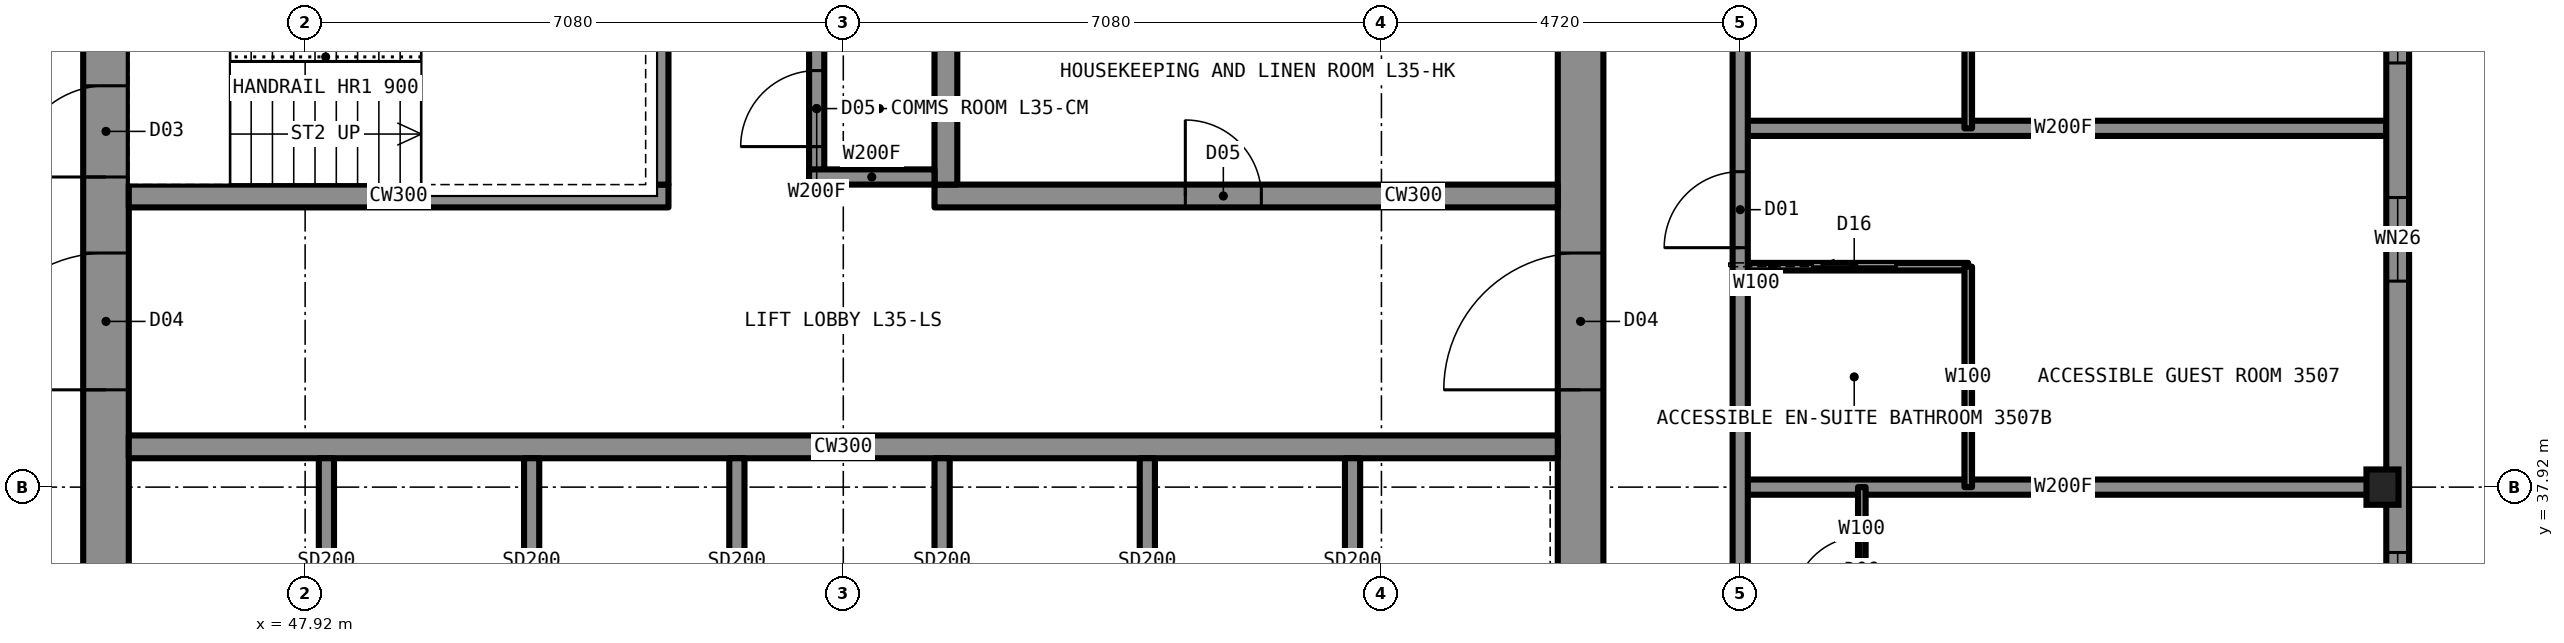
"""IFC4 building model, lengths in metres.
Left out: names, types, materials, properties, quantities, classifications, styles, units other than length and angle.
Written with IfcOpenShell. Run it as: python <this file> out.ifc"""

import sys

from ifc_helpers import new_model, si_unit, direction, frame, frame_2d, origin, origin_2d, place, context, subcontext, project, spatial, rectangle, i_section, extrude, element, fill, save


model = new_model("IFC4")
c1 = context("Model", 3, precision=1e-05, world=origin(), true_north=direction((0.0, 1.0)))
c2 = subcontext(c1, "Body", "Model", "MODEL_VIEW")
j1 = project(units=[si_unit("LENGTHUNIT", "METRE"), si_unit("PLANEANGLEUNIT", "RADIAN")], contexts=[c1])
p1 = place(None, origin())
s1 = spatial("IfcSite", under=j1, at=p1, CompositionType="ELEMENT")
p2 = place(p1, origin())
s2 = spatial("IfcBuilding", under=s1, at=p2, CompositionType="ELEMENT")
p3 = place(p2, frame((0.0, 0.0, 124.9)))
s3 = spatial("IfcBuildingStorey", under=s2, at=p3, CompositionType="ELEMENT", Elevation=124.9)
p4 = place(p3, frame((75.25, 37.92, 0.0), z_axis=(0.0, 0.0, 1.0), x_axis=(1.0, 0.0, 0.0)))
e1 = element("IfcColumn", 1, at=p4, inside=s3, PredefinedType="COLUMN", context=c2, shape_type="SweptSolid", body=[
    extrude(i_section(OverallWidth=0.422, OverallDepth=0.465, WebThickness=0.045, FlangeThickness=0.073, at=origin_2d()), origin(), (0.0, 0.0, 1.0), 3.5),
])
p5 = place(p3, frame((64.7, 35.6, 0.0), z_axis=(0.0, 0.0, 1.0), x_axis=(0.0, 1.0, 0.0)))
e2 = element("IfcWall", 2, at=p5, inside=s3, PredefinedType="SHEAR", context=c2, shape_type="SweptSolid", body=[
    extrude(rectangle(XDim=18.8, YDim=0.6, at=frame_2d((9.4, 0.0))), origin(), (0.0, 0.0, 1.0), 3.5),
])
p6 = place(p5, frame((13.4, 0.0, 0.0)))
e3 = element("IfcOpeningElement", 3, at=p6, cuts=e2, PredefinedType="OPENING", context=c2, shape_type="SweptSolid", body=[
    extrude(rectangle(XDim=1.8, YDim=2.2, at=frame_2d((0.9, 1.1))), frame((0.0, 0.31, 0.0), z_axis=(0.0, -1.0, 0.0), x_axis=(1.0, 0.0, 0.0)), (0.0, 0.0, 1.0), 0.62),
])
p7 = place(p5, frame((3.6, 0.0, 0.0)))
e4 = element("IfcOpeningElement", 4, at=p7, cuts=e2, PredefinedType="OPENING", context=c2, shape_type="SweptSolid", body=[
    extrude(rectangle(XDim=1.8, YDim=2.2, at=frame_2d((0.9, 1.1))), frame((0.0, 0.31, 0.0), z_axis=(0.0, -1.0, 0.0), x_axis=(1.0, 0.0, 0.0)), (0.0, 0.0, 1.0), 0.62),
])
p8 = place(p3, frame((45.3, 35.6, 0.0), z_axis=(0.0, 0.0, 1.0), x_axis=(0.0, 1.0, 0.0)))
e5 = element("IfcWall", 5, at=p8, inside=s3, PredefinedType="SHEAR", context=c2, shape_type="SweptSolid", body=[
    extrude(rectangle(XDim=18.8, YDim=0.6, at=frame_2d((9.4, 0.0))), origin(), (0.0, 0.0, 1.0), 3.5),
])
p9 = place(p8, frame((13.4, 0.0, 0.0)))
e6 = element("IfcOpeningElement", 6, at=p9, cuts=e5, PredefinedType="OPENING", context=c2, shape_type="SweptSolid", body=[
    extrude(rectangle(XDim=1.8, YDim=2.2, at=frame_2d((0.9, 1.1))), frame((0.0, 0.31, 0.0), z_axis=(0.0, -1.0, 0.0), x_axis=(1.0, 0.0, 0.0)), (0.0, 0.0, 1.0), 0.62),
])
p10 = place(p8, frame((3.6, 0.0, 0.0)))
e7 = element("IfcOpeningElement", 7, at=p10, cuts=e5, PredefinedType="OPENING", context=c2, shape_type="SweptSolid", body=[
    extrude(rectangle(XDim=1.8, YDim=2.2, at=frame_2d((0.9, 1.1))), frame((0.0, 0.31, 0.0), z_axis=(0.0, -1.0, 0.0), x_axis=(1.0, 0.0, 0.0)), (0.0, 0.0, 1.0), 0.62),
])
p11 = place(p8, frame((6.4, 0.0, 0.0)))
e8 = element("IfcOpeningElement", 8, at=p11, cuts=e5, PredefinedType="OPENING", context=c2, shape_type="SweptSolid", body=[
    extrude(rectangle(XDim=1.2, YDim=2.2, at=frame_2d((0.6, 1.1))), frame((0.0, 0.31, 0.0), z_axis=(0.0, -1.0, 0.0), x_axis=(1.0, 0.0, 0.0)), (0.0, 0.0, 1.0), 0.62),
])
p12 = place(p3, frame((45.6, 38.45, 0.0), z_axis=(0.0, 0.0, 1.0), x_axis=(1.0, 0.0, 0.0)))
e9 = element("IfcWall", 9, at=p12, inside=s3, PredefinedType="SHEAR", context=c2, shape_type="SweptSolid", body=[
    extrude(rectangle(XDim=18.8, YDim=0.3, at=frame_2d((9.4, 0.0))), origin(), (0.0, 0.0, 1.0), 3.5),
])
p13 = place(p3, frame((45.6, 41.75, 0.0), z_axis=(0.0, 0.0, 1.0), x_axis=(1.0, 0.0, 0.0)))
e10 = element("IfcWall", 10, at=p13, inside=s3, PredefinedType="SHEAR", context=c2, shape_type="SweptSolid", body=[
    extrude(rectangle(XDim=7.1, YDim=0.3, at=frame_2d((3.55, 0.0))), origin(), (0.0, 0.0, 1.0), 3.5),
])
p14 = place(p3, frame((56.2, 41.75, 0.0), z_axis=(0.0, 0.0, 1.0), x_axis=(1.0, 0.0, 0.0)))
e11 = element("IfcWall", 11, at=p14, inside=s3, PredefinedType="SHEAR", context=c2, shape_type="SweptSolid", body=[
    extrude(rectangle(XDim=8.2, YDim=0.3, at=frame_2d((4.1, 0.0))), origin(), (0.0, 0.0, 1.0), 3.5),
])
p15 = place(p14, frame((3.3, 0.0, 0.0)))
e12 = element("IfcOpeningElement", 12, at=p15, cuts=e11, PredefinedType="OPENING", context=c2, shape_type="SweptSolid", body=[
    extrude(rectangle(XDim=1.0, YDim=2.1, at=frame_2d((0.5, 1.05))), frame((0.0, 0.16, 0.0), z_axis=(0.0, -1.0, 0.0), x_axis=(1.0, 0.0, 0.0)), (0.0, 0.0, 1.0), 0.32),
])
p16 = place(p3, frame((52.55, 41.9, 0.0), z_axis=(0.0, 0.0, 1.0), x_axis=(0.0, 1.0, 0.0)))
e13 = element("IfcWall", 13, at=p16, inside=s3, PredefinedType="SHEAR", context=c2, shape_type="SweptSolid", body=[
    extrude(rectangle(XDim=6.2, YDim=0.3, at=frame_2d((3.1, 0.0))), origin(), (0.0, 0.0, 1.0), 3.5),
])
p17 = place(p16, frame((4.125, 0.0, 0.0)))
e14 = element("IfcOpeningElement", 14, at=p17, cuts=e13, PredefinedType="OPENING", context=c2, shape_type="SweptSolid", body=[
    extrude(rectangle(XDim=1.2, YDim=2.2, at=frame_2d((0.6, 1.1))), frame((0.0, 0.16, 0.0), z_axis=(0.0, -1.0, 0.0), x_axis=(1.0, 0.0, 0.0)), (0.0, 0.0, 1.0), 0.32),
])
p18 = place(p3, frame((56.35, 41.9, 0.0), z_axis=(0.0, 0.0, 1.0), x_axis=(0.0, 1.0, 0.0)))
e15 = element("IfcWall", 15, at=p18, inside=s3, PredefinedType="SHEAR", context=c2, shape_type="SweptSolid", body=[
    extrude(rectangle(XDim=9.5, YDim=0.3, at=frame_2d((4.75, 0.0))), origin(), (0.0, 0.0, 1.0), 3.5),
])
p19 = place(p18, frame((7.1, 0.0, 0.0)))
e16 = element("IfcOpeningElement", 16, at=p19, cuts=e15, PredefinedType="OPENING", context=c2, shape_type="SweptSolid", body=[
    extrude(rectangle(XDim=1.8, YDim=2.2, at=frame_2d((0.9, 1.1))), frame((0.0, 0.16, 0.0), z_axis=(0.0, -1.0, 0.0), x_axis=(1.0, 0.0, 0.0)), (0.0, 0.0, 1.0), 0.32),
])
p20 = place(p3, frame((66.8, 42.64, 0.0), z_axis=(0.0, 0.0, 1.0), x_axis=(1.0, 0.0, 0.0)))
e17 = element("IfcWall", 17, at=p20, inside=s3, PredefinedType="PARTITIONING", context=c2, shape_type="SweptSolid", body=[
    extrude(rectangle(XDim=8.5, YDim=0.2, at=frame_2d((4.25, 0.0))), origin(), (0.0, 0.0, 1.0), 2.731),
])
p21 = place(p3, frame((66.8, 40.82, 0.0), z_axis=(0.0, 0.0, 1.0), x_axis=(1.0, 0.0, 0.0)))
e18 = element("IfcWall", 18, at=p21, inside=s3, PredefinedType="PARTITIONING", context=c2, shape_type="SweptSolid", body=[
    extrude(rectangle(XDim=3.0, YDim=0.1, at=frame_2d((1.5, 0.0))), origin(), (0.0, 0.0, 1.0), 3.33),
])
p22 = place(p21, frame((0.95, 0.0, 0.0)))
e19 = element("IfcOpeningElement", 19, at=p22, cuts=e18, PredefinedType="OPENING", context=c2, shape_type="SweptSolid", body=[
    extrude(rectangle(XDim=1.1, YDim=2.1, at=frame_2d((0.55, 1.05))), frame((0.0, 0.06, 0.0), z_axis=(0.0, -1.0, 0.0), x_axis=(1.0, 0.0, 0.0)), (0.0, 0.0, 1.0), 0.12),
])
p23 = place(p3, frame((66.8, 37.92, 0.0), z_axis=(0.0, 0.0, 1.0), x_axis=(1.0, 0.0, 0.0)))
e20 = element("IfcWall", 20, at=p23, inside=s3, PredefinedType="PARTITIONING", context=c2, shape_type="SweptSolid", body=[
    extrude(rectangle(XDim=8.5, YDim=0.2, at=frame_2d((4.25, 0.0))), origin(), (0.0, 0.0, 1.0), 2.573),
])
p24 = place(p3, frame((66.8, 33.22, 0.0), z_axis=(0.0, 0.0, 1.0), x_axis=(0.0, 1.0, 0.0)))
e21 = element("IfcWall", 21, at=p24, inside=s3, PredefinedType="PARTITIONING", context=c2, shape_type="SweptSolid", body=[
    extrude(rectangle(XDim=23.58, YDim=0.2, at=frame_2d((11.79, 0.0))), origin(), (0.0, 0.0, 1.0), 3.33),
])
p25 = place(p24, frame((7.85, 0.0, 0.0)))
e22 = element("IfcOpeningElement", 22, at=p25, cuts=e21, PredefinedType="OPENING", context=c2, shape_type="SweptSolid", body=[
    extrude(rectangle(XDim=1.0, YDim=2.2, at=frame_2d((0.5, 1.1))), frame((0.0, 0.11, 0.0), z_axis=(0.0, -1.0, 0.0), x_axis=(1.0, 0.0, 0.0)), (0.0, 0.0, 1.0), 0.22),
])
p26 = place(p24, frame((12.42, 0.0, 0.0)))
e23 = element("IfcOpeningElement", 23, at=p26, cuts=e21, PredefinedType="OPENING", context=c2, shape_type="SweptSolid", body=[
    extrude(rectangle(XDim=1.0, YDim=2.2, at=frame_2d((0.5, 1.1))), frame((0.0, 0.11, 0.0), z_axis=(0.0, -1.0, 0.0), x_axis=(1.0, 0.0, 0.0)), (0.0, 0.0, 1.0), 0.22),
])
p27 = place(p24, frame((21.83, 0.0, 0.0)))
e24 = element("IfcOpeningElement", 24, at=p27, cuts=e21, PredefinedType="OPENING", context=c2, shape_type="SweptSolid", body=[
    extrude(rectangle(XDim=1.1, YDim=2.2, at=frame_2d((0.55, 1.1))), frame((0.0, 0.11, 0.0), z_axis=(0.0, -1.0, 0.0), x_axis=(1.0, 0.0, 0.0)), (0.0, 0.0, 1.0), 0.22),
])
p28 = place(p24, frame((0.63, 0.0, 0.0)))
e25 = element("IfcOpeningElement", 25, at=p28, cuts=e21, PredefinedType="OPENING", context=c2, shape_type="SweptSolid", body=[
    extrude(rectangle(XDim=1.1, YDim=2.2, at=frame_2d((0.55, 1.1))), frame((0.0, 0.11, 0.0), z_axis=(0.0, -1.0, 0.0), x_axis=(1.0, 0.0, 0.0)), (0.0, 0.0, 1.0), 0.22),
])
p29 = place(p3, frame((68.4, 35.72, 0.0), z_axis=(0.0, 0.0, 1.0), x_axis=(0.0, 1.0, 0.0)))
e26 = element("IfcWall", 26, at=p29, inside=s3, PredefinedType="PARTITIONING", context=c2, shape_type="SweptSolid", body=[
    extrude(rectangle(XDim=2.2, YDim=0.1, at=frame_2d((1.1, 0.0))), origin(), (0.0, 0.0, 1.0), 3.33),
])
p30 = place(p29, frame((0.65, 0.0, 0.0)))
e27 = element("IfcOpeningElement", 27, at=p30, cuts=e26, PredefinedType="OPENING", context=c2, shape_type="SweptSolid", body=[
    extrude(rectangle(XDim=0.9, YDim=2.1, at=frame_2d((0.45, 1.05))), frame((0.0, 0.06, 0.0), z_axis=(0.0, -1.0, 0.0), x_axis=(1.0, 0.0, 0.0)), (0.0, 0.0, 1.0), 0.12),
])
p31 = place(p3, frame((69.8, 37.92, 0.0), z_axis=(0.0, 0.0, 1.0), x_axis=(0.0, 1.0, 0.0)))
e28 = element("IfcWall", 28, at=p31, inside=s3, PredefinedType="PARTITIONING", context=c2, shape_type="SweptSolid", body=[
    extrude(rectangle(XDim=2.9, YDim=0.1, at=frame_2d((1.45, 0.0))), origin(), (0.0, 0.0, 1.0), 3.33),
])
p32 = place(p3, frame((69.8, 42.64, 0.0), z_axis=(0.0, 0.0, 1.0), x_axis=(0.0, 1.0, 0.0)))
e29 = element("IfcWall", 29, at=p32, inside=s3, PredefinedType="PARTITIONING", context=c2, shape_type="SweptSolid", body=[
    extrude(rectangle(XDim=2.6, YDim=0.1, at=frame_2d((1.3, 0.0))), origin(), (0.0, 0.0, 1.0), 3.33),
])
p33 = place(p3, frame((54.35, 42.0, 0.0), z_axis=(0.0, 0.0, 1.0), x_axis=(0.0, 1.0, 0.0)))
e30 = element("IfcWall", 30, at=p33, inside=s3, PredefinedType="PARTITIONING", context=c2, shape_type="SweptSolid", body=[
    extrude(rectangle(XDim=2.5, YDim=0.2, at=frame_2d((1.25, 0.0))), origin(), (0.0, 0.0, 1.0), 3.33),
])
p34 = place(p33, frame((0.75, 0.0, 0.0)))
e31 = element("IfcOpeningElement", 31, at=p34, cuts=e30, PredefinedType="OPENING", context=c2, shape_type="SweptSolid", body=[
    extrude(rectangle(XDim=1.0, YDim=2.1, at=frame_2d((0.5, 1.05))), frame((0.0, 0.11, 0.0), z_axis=(0.0, -1.0, 0.0), x_axis=(1.0, 0.0, 0.0)), (0.0, 0.0, 1.0), 0.22),
])
p35 = place(p3, frame((54.25, 42.0, 0.0), z_axis=(0.0, 0.0, 1.0), x_axis=(1.0, 0.0, 0.0)))
e32 = element("IfcWall", 32, at=p35, inside=s3, PredefinedType="PARTITIONING", context=c2, shape_type="SweptSolid", body=[
    extrude(rectangle(XDim=1.95, YDim=0.2, at=frame_2d((0.975, 0.0))), origin(), (0.0, 0.0, 1.0), 3.33),
])
p36 = place(p3, frame((75.45, 29.9, 0.0), z_axis=(0.0, 0.0, 1.0), x_axis=(0.0, 1.0, 0.0)))
e33 = element("IfcWall", 33, at=p36, inside=s3, PredefinedType="SOLIDWALL", context=c2, shape_type="SweptSolid", body=[
    extrude(rectangle(XDim=30.2, YDim=0.3, at=frame_2d((15.1, 0.0))), origin(), (0.0, 0.0, 1.0), 2.83),
])
p37 = place(p36, frame((0.85, 0.0, 0.5)))
e34 = element("IfcOpeningElement", 34, at=p37, cuts=e33, PredefinedType="OPENING", context=c2, shape_type="SweptSolid", body=[
    extrude(rectangle(XDim=1.6, YDim=2.0, at=frame_2d((0.8, 1.0))), frame((0.0, 0.16, 0.0), z_axis=(0.0, -1.0, 0.0), x_axis=(1.0, 0.0, 0.0)), (0.0, 0.0, 1.0), 0.32),
])
p38 = place(p36, frame((4.16, 0.0, 0.5)))
e35 = element("IfcOpeningElement", 35, at=p38, cuts=e33, PredefinedType="OPENING", context=c2, shape_type="SweptSolid", body=[
    extrude(rectangle(XDim=3.0, YDim=2.0, at=frame_2d((1.5, 1.0))), frame((0.0, 0.16, 0.0), z_axis=(0.0, -1.0, 0.0), x_axis=(1.0, 0.0, 0.0)), (0.0, 0.0, 1.0), 0.32),
])
p39 = place(p36, frame((8.88, 0.0, 0.5)))
e36 = element("IfcOpeningElement", 36, at=p39, cuts=e33, PredefinedType="OPENING", context=c2, shape_type="SweptSolid", body=[
    extrude(rectangle(XDim=3.0, YDim=2.0, at=frame_2d((1.5, 1.0))), frame((0.0, 0.16, 0.0), z_axis=(0.0, -1.0, 0.0), x_axis=(1.0, 0.0, 0.0)), (0.0, 0.0, 1.0), 0.32),
])
p40 = place(p36, frame((18.32, 0.0, 0.5)))
e37 = element("IfcOpeningElement", 37, at=p40, cuts=e33, PredefinedType="OPENING", context=c2, shape_type="SweptSolid", body=[
    extrude(rectangle(XDim=3.0, YDim=2.0, at=frame_2d((1.5, 1.0))), frame((0.0, 0.16, 0.0), z_axis=(0.0, -1.0, 0.0), x_axis=(1.0, 0.0, 0.0)), (0.0, 0.0, 1.0), 0.32),
])
p41 = place(p36, frame((23.04, 0.0, 0.5)))
e38 = element("IfcOpeningElement", 38, at=p41, cuts=e33, PredefinedType="OPENING", context=c2, shape_type="SweptSolid", body=[
    extrude(rectangle(XDim=3.0, YDim=2.0, at=frame_2d((1.5, 1.0))), frame((0.0, 0.16, 0.0), z_axis=(0.0, -1.0, 0.0), x_axis=(1.0, 0.0, 0.0)), (0.0, 0.0, 1.0), 0.32),
])
p42 = place(p36, frame((27.75, 0.0, 0.5)))
e39 = element("IfcOpeningElement", 39, at=p42, cuts=e33, PredefinedType="OPENING", context=c2, shape_type="SweptSolid", body=[
    extrude(rectangle(XDim=1.6, YDim=2.0, at=frame_2d((0.8, 1.0))), frame((0.0, 0.16, 0.0), z_axis=(0.0, -1.0, 0.0), x_axis=(1.0, 0.0, 0.0)), (0.0, 0.0, 1.0), 0.32),
])
for number, where, z_axis, x_axis in (
    (40, (48.2, 35.6, 0.0), (0.0, 0.0, 1.0), (0.0, 1.0, 0.0)),
    (41, (50.9, 35.6, 0.0), (0.0, 0.0, 1.0), (0.0, 1.0, 0.0)),
    (42, (53.6, 35.6, 0.0), (0.0, 0.0, 1.0), (0.0, 1.0, 0.0)),
    (43, (56.3, 35.6, 0.0), (0.0, 0.0, 1.0), (0.0, 1.0, 0.0)),
    (44, (59.0, 35.6, 0.0), (0.0, 0.0, 1.0), (0.0, 1.0, 0.0)),
    (45, (61.7, 35.6, 0.0), (0.0, 0.0, 1.0), (0.0, 1.0, 0.0)),
):
    element("IfcWall", number, at=place(p3, frame(where, z_axis=z_axis, x_axis=x_axis)), inside=s3, PredefinedType="PARTITIONING", context=c2, shape_type="SweptSolid", body=[
        extrude(rectangle(XDim=2.7, YDim=0.2, at=frame_2d((1.35, 0.0))), origin(), (0.0, 0.0, 1.0), 3.33),
    ])
p43 = place(p25, origin())
e46 = element("IfcDoor", 46, at=p43, inside=s3, OperationType="SINGLE_SWING_LEFT", PredefinedType="DOOR", context=c2, shape_type="SweptSolid", body=[
    extrude(rectangle(XDim=1.0, YDim=2.2, at=frame_2d((0.5, 1.1))), frame((0.0, 0.025, 0.0), z_axis=(0.0, -1.0, 0.0), x_axis=(1.0, 0.0, 0.0)), (0.0, 0.0, 1.0), 0.05),
])
fill(e22, e46)
p44 = place(p22, origin())
e47 = element("IfcDoor", 47, at=p44, inside=s3, OperationType="SLIDING_TO_LEFT", PredefinedType="DOOR", context=c2, shape_type="SweptSolid", body=[
    extrude(rectangle(XDim=1.1, YDim=2.1, at=frame_2d((0.55, 1.05))), frame((0.0, 0.025, 0.0), z_axis=(0.0, -1.0, 0.0), x_axis=(1.0, 0.0, 0.0)), (0.0, 0.0, 1.0), 0.05),
])
fill(e19, e47)
p45 = place(p30, origin())
e48 = element("IfcDoor", 48, at=p45, inside=s3, OperationType="SINGLE_SWING_LEFT", PredefinedType="DOOR", context=c2, shape_type="SweptSolid", body=[
    extrude(rectangle(XDim=0.9, YDim=2.1, at=frame_2d((0.45, 1.05))), frame((0.0, 0.025, 0.0), z_axis=(0.0, -1.0, 0.0), x_axis=(1.0, 0.0, 0.0)), (0.0, 0.0, 1.0), 0.05),
])
fill(e27, e48)
p46 = place(p34, origin())
e49 = element("IfcDoor", 49, at=p46, inside=s3, OperationType="SINGLE_SWING_LEFT", PredefinedType="DOOR", context=c2, shape_type="SweptSolid", body=[
    extrude(rectangle(XDim=1.0, YDim=2.1, at=frame_2d((0.5, 1.05))), frame((0.0, 0.025, 0.0), z_axis=(0.0, -1.0, 0.0), x_axis=(1.0, 0.0, 0.0)), (0.0, 0.0, 1.0), 0.05),
])
fill(e31, e49)
p47 = place(p38, origin())
e50 = element("IfcWindow", 50, at=p47, inside=s3, PartitioningType="SINGLE_PANEL", PredefinedType="WINDOW", context=c2, shape_type="SweptSolid", body=[
    extrude(rectangle(XDim=3.0, YDim=2.0, at=frame_2d((1.5, 1.0))), frame((0.0, 0.03, 0.0), z_axis=(0.0, -1.0, 0.0), x_axis=(1.0, 0.0, 0.0)), (0.0, 0.0, 1.0), 0.06),
])
fill(e35, e50)
p48 = place(p39, origin())
e51 = element("IfcWindow", 51, at=p48, inside=s3, PartitioningType="SINGLE_PANEL", PredefinedType="WINDOW", context=c2, shape_type="SweptSolid", body=[
    extrude(rectangle(XDim=3.0, YDim=2.0, at=frame_2d((1.5, 1.0))), frame((0.0, 0.03, 0.0), z_axis=(0.0, -1.0, 0.0), x_axis=(1.0, 0.0, 0.0)), (0.0, 0.0, 1.0), 0.06),
])
fill(e36, e51)
p49 = place(p10, origin())
e52 = element("IfcDoor", 52, at=p49, inside=s3, OperationType="DOUBLE_DOOR_SINGLE_SWING", PredefinedType="DOOR", context=c2, shape_type="SweptSolid", body=[
    extrude(rectangle(XDim=1.8, YDim=2.2, at=frame_2d((0.9, 1.1))), frame((0.0, 0.025, 0.0), z_axis=(0.0, -1.0, 0.0), x_axis=(1.0, 0.0, 0.0)), (0.0, 0.0, 1.0), 0.05),
])
fill(e7, e52)
p50 = place(p7, origin())
e53 = element("IfcDoor", 53, at=p50, inside=s3, OperationType="DOUBLE_DOOR_SINGLE_SWING", PredefinedType="DOOR", context=c2, shape_type="SweptSolid", body=[
    extrude(rectangle(XDim=1.8, YDim=2.2, at=frame_2d((0.9, 1.1))), frame((0.0, 0.025, 0.0), z_axis=(0.0, -1.0, 0.0), x_axis=(1.0, 0.0, 0.0)), (0.0, 0.0, 1.0), 0.05),
])
fill(e4, e53)
p51 = place(p11, origin())
e54 = element("IfcDoor", 54, at=p51, inside=s3, OperationType="SINGLE_SWING_LEFT", PredefinedType="DOOR", context=c2, shape_type="SweptSolid", body=[
    extrude(rectangle(XDim=1.2, YDim=2.2, at=frame_2d((0.6, 1.1))), frame((0.0, 0.025, 0.0), z_axis=(0.0, -1.0, 0.0), x_axis=(1.0, 0.0, 0.0)), (0.0, 0.0, 1.0), 0.05),
])
fill(e8, e54)
p52 = place(p15, origin())
e55 = element("IfcDoor", 55, at=p52, inside=s3, OperationType="SINGLE_SWING_LEFT", PredefinedType="DOOR", context=c2, shape_type="SweptSolid", body=[
    extrude(rectangle(XDim=1.0, YDim=2.1, at=frame_2d((0.5, 1.05))), frame((0.0, 0.025, 0.0), z_axis=(0.0, -1.0, 0.0), x_axis=(1.0, 0.0, 0.0)), (0.0, 0.0, 1.0), 0.05),
])
fill(e12, e55)
save(model, sys.argv[1])
